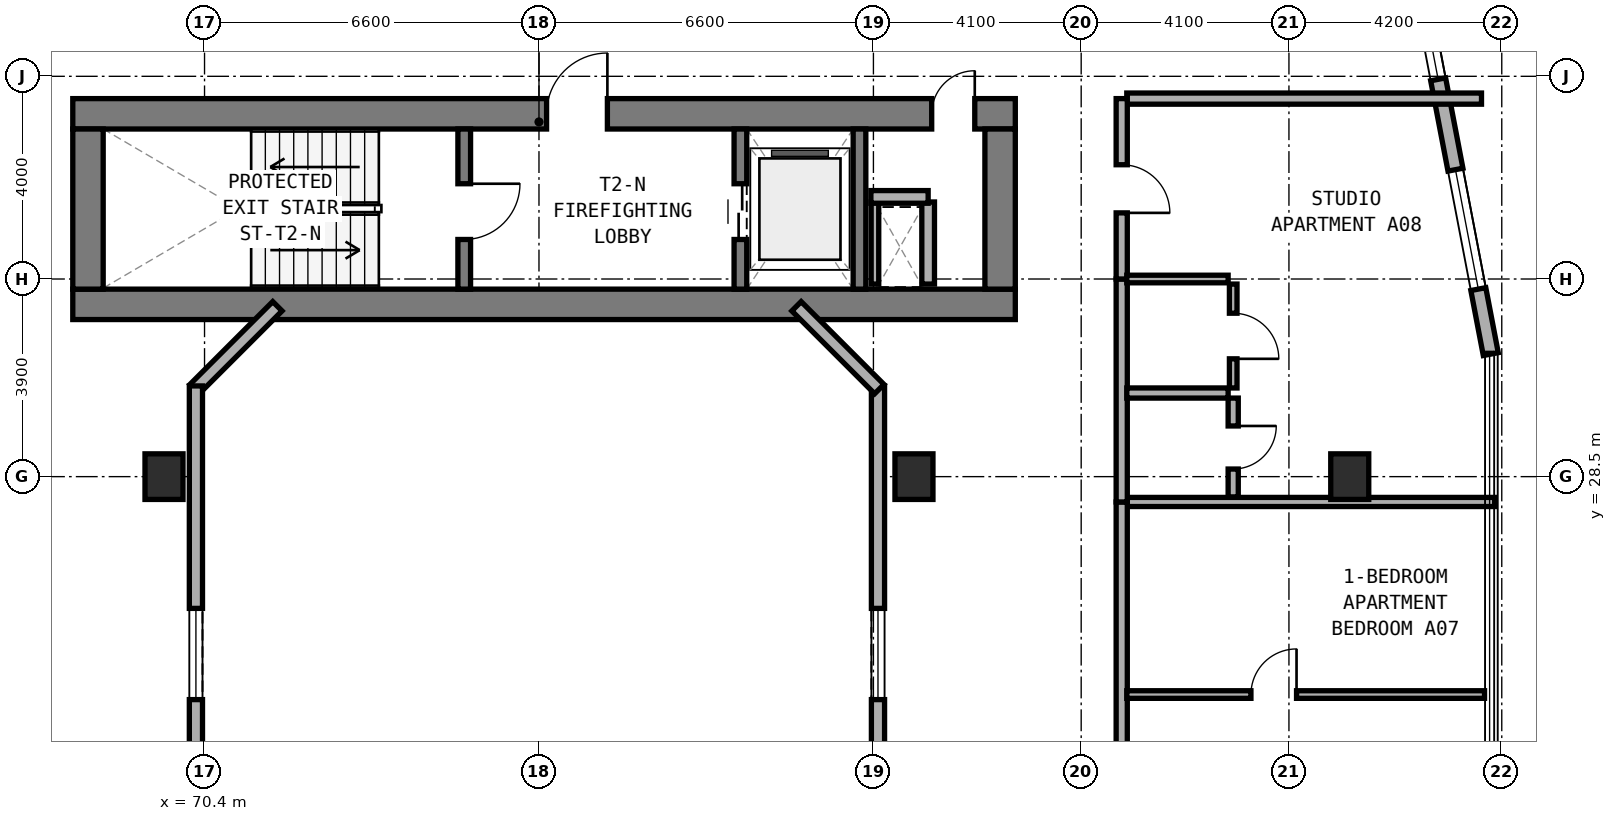
"""IFC4 building model, lengths in metres.
Left out: names, types, materials, properties, quantities, classifications, styles, units other than length and angle.
Written with IfcOpenShell. Run it as: python <this file> out.ifc"""

import sys

from ifc_helpers import new_model, si_unit, direction, frame, frame_2d, origin, origin_2d, place, context, subcontext, project, spatial, rectangle, extrude, element, fill, save


model = new_model("IFC4")
c1 = context("Model", 3, precision=1e-05, world=origin(), true_north=direction((0.0, 1.0)))
c2 = subcontext(c1, "Body", "Model", "MODEL_VIEW")
j1 = project(units=[si_unit("LENGTHUNIT", "METRE"), si_unit("PLANEANGLEUNIT", "RADIAN")], contexts=[c1])
p1 = place(None, origin())
s1 = spatial("IfcSite", under=j1, at=p1, CompositionType="ELEMENT")
p2 = place(p1, origin())
s2 = spatial("IfcBuilding", under=s1, at=p2, CompositionType="ELEMENT")
p3 = place(p2, frame((0.0, 0.0, 24.0)))
s3 = spatial("IfcBuildingStorey", under=s2, at=p3, CompositionType="ELEMENT", Elevation=24.0)
p4 = place(p3, frame((67.8, 31.9, 0.0), z_axis=(0.0, 0.0, 1.0), x_axis=(1.0, 0.0, 0.0)))
e1 = element("IfcWall", 1, at=p4, inside=s3, PredefinedType="SHEAR", context=c2, shape_type="SweptSolid", body=[
    extrude(rectangle(XDim=18.6, YDim=0.6, at=frame_2d((9.3, 0.0))), origin(), (0.0, 0.0, 1.0), 3.5),
])
p5 = place(p3, frame((67.8, 35.66, 0.0), z_axis=(0.0, 0.0, 1.0), x_axis=(1.0, 0.0, 0.0)))
e2 = element("IfcWall", 2, at=p5, inside=s3, PredefinedType="SHEAR", context=c2, shape_type="SweptSolid", body=[
    extrude(rectangle(XDim=18.6, YDim=0.6, at=frame_2d((9.3, 0.0))), origin(), (0.0, 0.0, 1.0), 3.5),
])
p6 = place(p5, frame((9.35, 0.0, 0.0)))
e3 = element("IfcOpeningElement", 3, at=p6, cuts=e2, PredefinedType="OPENING", context=c2, shape_type="SweptSolid", body=[
    extrude(rectangle(XDim=1.2, YDim=2.15, at=frame_2d((0.6, 1.075))), frame((0.0, 0.31, 0.0), z_axis=(0.0, -1.0, 0.0), x_axis=(1.0, 0.0, 0.0)), (0.0, 0.0, 1.0), 0.62),
])
p7 = place(p5, frame((16.95, 0.0, 0.0)))
e4 = element("IfcOpeningElement", 4, at=p7, cuts=e2, PredefinedType="OPENING", context=c2, shape_type="SweptSolid", body=[
    extrude(rectangle(XDim=0.85, YDim=2.1, at=frame_2d((0.425, 1.05))), frame((0.0, 0.31, 0.0), z_axis=(0.0, -1.0, 0.0), x_axis=(1.0, 0.0, 0.0)), (0.0, 0.0, 1.0), 0.62),
])
for number, where, z_axis, x_axis in (
    (5, (68.1, 32.2, 0.0), (0.0, 0.0, 1.0), (0.0, 1.0, 0.0)),
    (6, (86.1, 32.2, 0.0), (0.0, 0.0, 1.0), (0.0, 1.0, 0.0)),
):
    element("IfcWall", number, at=place(p3, frame(where, z_axis=z_axis, x_axis=x_axis)), inside=s3, PredefinedType="SHEAR", context=c2, shape_type="SweptSolid", body=[
        extrude(rectangle(XDim=3.16, YDim=0.6, at=frame_2d((1.58, 0.0))), origin(), (0.0, 0.0, 1.0), 3.5),
    ])
p8 = place(p3, frame((75.525, 32.2, 0.0), z_axis=(0.0, 0.0, 1.0), x_axis=(0.0, 1.0, 0.0)))
e7 = element("IfcWall", 7, at=p8, inside=s3, PredefinedType="STANDARD", context=c2, shape_type="SweptSolid", body=[
    extrude(rectangle(XDim=3.16, YDim=0.25, at=frame_2d((1.58, 0.0))), origin(), (0.0, 0.0, 1.0), 3.25),
])
p9 = place(p8, frame((0.98, 0.0, 0.0)))
e8 = element("IfcOpeningElement", 8, at=p9, cuts=e7, PredefinedType="OPENING", context=c2, shape_type="SweptSolid", body=[
    extrude(rectangle(XDim=1.1, YDim=2.15, at=frame_2d((0.55, 1.075))), frame((0.0, 0.135, 0.0), z_axis=(0.0, -1.0, 0.0), x_axis=(1.0, 0.0, 0.0)), (0.0, 0.0, 1.0), 0.27),
])
p10 = place(p3, frame((80.975, 32.2, 0.0), z_axis=(0.0, 0.0, 1.0), x_axis=(0.0, 1.0, 0.0)))
e9 = element("IfcWall", 9, at=p10, inside=s3, PredefinedType="STANDARD", context=c2, shape_type="SweptSolid", body=[
    extrude(rectangle(XDim=3.16, YDim=0.25, at=frame_2d((1.58, 0.0))), origin(), (0.0, 0.0, 1.0), 3.25),
])
p11 = place(p10, frame((0.98, 0.0, 0.0)))
e10 = element("IfcOpeningElement", 10, at=p11, cuts=e9, PredefinedType="OPENING", context=c2, shape_type="SweptSolid", body=[
    extrude(rectangle(XDim=1.1, YDim=2.15, at=frame_2d((0.55, 1.075))), frame((0.0, 0.135, 0.0), z_axis=(0.0, -1.0, 0.0), x_axis=(1.0, 0.0, 0.0)), (0.0, 0.0, 1.0), 0.27),
])
p12 = place(p3, frame((83.325, 32.2, 0.0), z_axis=(0.0, 0.0, 1.0), x_axis=(0.0, 1.0, 0.0)))
e11 = element("IfcWall", 11, at=p12, inside=s3, PredefinedType="STANDARD", context=c2, shape_type="SweptSolid", body=[
    extrude(rectangle(XDim=3.16, YDim=0.25, at=frame_2d((1.58, 0.0))), origin(), (0.0, 0.0, 1.0), 3.25),
])
for number, where, z_axis, x_axis in (
    (12, (93.0, 28.5, 0.0), (0.0, 0.0, 1.0), (1.0, 0.0, 0.0)),
    (13, (69.6, 28.5, 0.0), (0.0, 0.0, 1.0), (1.0, 0.0, 0.0)),
    (14, (84.4, 28.5, 0.0), (0.0, 0.0, 1.0), (1.0, 0.0, 0.0)),
):
    element("IfcColumn", number, at=place(p3, frame(where, z_axis=z_axis, x_axis=x_axis)), inside=s3, PredefinedType="COLUMN", context=c2, shape_type="SweptSolid", body=[
        extrude(rectangle(XDim=0.75, YDim=0.9, at=origin_2d()), origin(), (0.0, 0.0, 1.0), 3.5),
    ])
p13 = place(p3, frame((95.783, 30.918, 0.0), z_axis=(0.0, 0.0, 1.0), x_axis=(-0.188087874316, 0.982152203854, 0.0)))
e15 = element("IfcWall", 15, at=p13, inside=s3, PredefinedType="STANDARD", context=c2, shape_type="SweptSolid", body=[
    extrude(rectangle(XDim=9.634, YDim=0.3, at=frame_2d((4.817, 0.0))), origin(), (0.0, 0.0, 1.0), 3.25),
])
p14 = place(p13, frame((1.306, 0.0, 0.8)))
e16 = element("IfcOpeningElement", 16, at=p14, cuts=e15, PredefinedType="OPENING", context=c2, shape_type="SweptSolid", body=[
    extrude(rectangle(XDim=2.4, YDim=1.6, at=frame_2d((1.2, 0.8))), frame((0.0, 0.16, 0.0), z_axis=(0.0, -1.0, 0.0), x_axis=(1.0, 0.0, 0.0)), (0.0, 0.0, 1.0), 0.32),
])
p15 = place(p13, frame((5.521, 0.0, 0.85)))
e17 = element("IfcOpeningElement", 17, at=p15, cuts=e15, PredefinedType="OPENING", context=c2, shape_type="SweptSolid", body=[
    extrude(rectangle(XDim=1.2, YDim=1.5, at=frame_2d((0.6, 0.75))), frame((0.0, 0.16, 0.0), z_axis=(0.0, -1.0, 0.0), x_axis=(1.0, 0.0, 0.0)), (0.0, 0.0, 1.0), 0.32),
])
p16 = place(p13, frame((7.682, 0.0, 0.85)))
e18 = element("IfcOpeningElement", 18, at=p16, cuts=e15, PredefinedType="OPENING", context=c2, shape_type="SweptSolid", body=[
    extrude(rectangle(XDim=1.5, YDim=1.5, at=frame_2d((0.75, 0.75))), frame((0.0, 0.16, 0.0), z_axis=(0.0, -1.0, 0.0), x_axis=(1.0, 0.0, 0.0)), (0.0, 0.0, 1.0), 0.32),
])
p17 = place(p3, frame((83.69, 19.71, 0.0), z_axis=(0.0, 0.0, 1.0), x_axis=(0.0, 1.0, 0.0)))
e19 = element("IfcWall", 19, at=p17, inside=s3, PredefinedType="STANDARD", context=c2, shape_type="SweptSolid", body=[
    extrude(rectangle(XDim=10.58, YDim=0.26, at=frame_2d((5.29, 0.0))), origin(), (0.0, 0.0, 1.0), 3.25),
])
p18 = place(p17, frame((4.39, 0.0, 0.85)))
e20 = element("IfcOpeningElement", 20, at=p18, cuts=e19, PredefinedType="OPENING", context=c2, shape_type="SweptSolid", body=[
    extrude(rectangle(XDim=1.8, YDim=1.5, at=frame_2d((0.9, 0.75))), frame((0.0, 0.14, 0.0), z_axis=(0.0, -1.0, 0.0), x_axis=(1.0, 0.0, 0.0)), (0.0, 0.0, 1.0), 0.28),
])
for number, where, z_axis, x_axis in (
    (21, (83.716, 30.228, 0.0), (0.0, 0.0, 1.0), (-0.707, 0.707, 0.0)),
    (22, (71.838, 31.862, 0.0), (0.0, 0.0, 1.0), (-0.707, -0.707, 0.0)),
):
    element("IfcWall", number, at=place(p3, frame(where, z_axis=z_axis, x_axis=x_axis)), inside=s3, PredefinedType="STANDARD", context=c2, shape_type="SweptSolid", body=[
        extrude(rectangle(XDim=2.311, YDim=0.26, at=frame_2d((1.155, 0.0))), origin(), (0.0, 0.0, 1.0), 3.25),
    ])
p19 = place(p3, frame((70.23, 30.29, 0.0), z_axis=(0.0, 0.0, 1.0), x_axis=(0.0, -1.0, 0.0)))
e23 = element("IfcWall", 23, at=p19, inside=s3, PredefinedType="STANDARD", context=c2, shape_type="SweptSolid", body=[
    extrude(rectangle(XDim=10.58, YDim=0.26, at=frame_2d((5.29, 0.0))), origin(), (0.0, 0.0, 1.0), 3.25),
])
p20 = place(p19, frame((4.39, 0.0, 0.85)))
e24 = element("IfcOpeningElement", 24, at=p20, cuts=e23, PredefinedType="OPENING", context=c2, shape_type="SweptSolid", body=[
    extrude(rectangle(XDim=1.8, YDim=1.5, at=frame_2d((0.9, 0.75))), frame((0.0, 0.14, 0.0), z_axis=(0.0, -1.0, 0.0), x_axis=(1.0, 0.0, 0.0)), (0.0, 0.0, 1.0), 0.28),
])
p21 = place(p3, frame((83.63, 32.3, 0.0), z_axis=(0.0, 0.0, 1.0), x_axis=(0.0, 1.0, 0.0)))
e25 = element("IfcWall", 25, at=p21, inside=s3, PredefinedType="PARTITIONING", context=c2, shape_type="SweptSolid", body=[
    extrude(rectangle(XDim=1.62, YDim=0.15, at=frame_2d((0.81, 0.0))), origin(), (0.0, 0.0, 1.0), 2.725),
])
p22 = place(p3, frame((84.68, 32.3, 0.0), z_axis=(0.0, 0.0, 1.0), x_axis=(0.0, 1.0, 0.0)))
e26 = element("IfcWall", 26, at=p22, inside=s3, PredefinedType="SOLIDWALL", context=c2, shape_type="SweptSolid", body=[
    extrude(rectangle(XDim=1.62, YDim=0.25, at=frame_2d((0.81, 0.0))), origin(), (0.0, 0.0, 1.0), 3.22),
])
p23 = place(p3, frame((83.55, 34.02, 0.0), z_axis=(0.0, 0.0, 1.0), x_axis=(1.0, 0.0, 0.0)))
e27 = element("IfcWall", 27, at=p23, inside=s3, PredefinedType="SOLIDWALL", context=c2, shape_type="SweptSolid", body=[
    extrude(rectangle(XDim=1.13, YDim=0.25, at=frame_2d((0.565, 0.0))), origin(), (0.0, 0.0, 1.0), 3.22),
])
p24 = place(p3, frame((88.6, 35.96, 0.0), z_axis=(0.0, 0.0, 1.0), x_axis=(1.0, 0.0, 0.0)))
e28 = element("IfcWall", 28, at=p24, inside=s3, PredefinedType="SOLIDWALL", context=c2, shape_type="SweptSolid", body=[
    extrude(rectangle(XDim=7.0, YDim=0.22, at=frame_2d((3.5, 0.0))), origin(), (0.0, 0.0, 1.0), 2.865),
])
p25 = place(p3, frame((88.5, 28.0, 0.0), z_axis=(0.0, 0.0, 1.0), x_axis=(1.0, 0.0, 0.0)))
e29 = element("IfcWall", 29, at=p25, inside=s3, PredefinedType="SOLIDWALL", context=c2, shape_type="SweptSolid", body=[
    extrude(rectangle(XDim=7.36, YDim=0.18, at=frame_2d((3.68, 0.0))), origin(), (0.0, 0.0, 1.0), 2.865),
])
p26 = place(p3, frame((88.5, 18.44, 0.0), z_axis=(0.0, 0.0, 1.0), x_axis=(0.0, 1.0, 0.0)))
e30 = element("IfcWall", 30, at=p26, inside=s3, PredefinedType="SOLIDWALL", context=c2, shape_type="SweptSolid", body=[
    extrude(rectangle(XDim=9.56, YDim=0.22, at=frame_2d((4.78, 0.0))), origin(), (0.0, 0.0, 1.0), 2.725),
])
p27 = place(p26, frame((2.405, 0.0, 0.0)))
e31 = element("IfcOpeningElement", 31, at=p27, cuts=e30, PredefinedType="OPENING", context=c2, shape_type="SweptSolid", body=[
    extrude(rectangle(XDim=0.95, YDim=2.1, at=frame_2d((0.475, 1.05))), frame((0.0, 0.12, 0.0), z_axis=(0.0, -1.0, 0.0), x_axis=(1.0, 0.0, 0.0)), (0.0, 0.0, 1.0), 0.24),
])
p28 = place(p3, frame((88.6, 24.2, 0.0), z_axis=(0.0, 0.0, 1.0), x_axis=(1.0, 0.0, 0.0)))
e32 = element("IfcWall", 32, at=p28, inside=s3, PredefinedType="PARTITIONING", context=c2, shape_type="SweptSolid", body=[
    extrude(rectangle(XDim=7.06, YDim=0.15, at=frame_2d((3.53, 0.0))), origin(), (0.0, 0.0, 1.0), 2.865),
])
p29 = place(p28, frame((2.45, 0.0, 0.0)))
e33 = element("IfcOpeningElement", 33, at=p29, cuts=e32, PredefinedType="OPENING", context=c2, shape_type="SweptSolid", body=[
    extrude(rectangle(XDim=0.9, YDim=2.1, at=frame_2d((0.45, 1.05))), frame((0.0, 0.085, 0.0), z_axis=(0.0, -1.0, 0.0), x_axis=(1.0, 0.0, 0.0)), (0.0, 0.0, 1.0), 0.17),
])
p30 = place(p3, frame((88.5, 28.0, 0.0), z_axis=(0.0, 0.0, 1.0), x_axis=(0.0, 1.0, 0.0)))
e34 = element("IfcWall", 34, at=p30, inside=s3, PredefinedType="SOLIDWALL", context=c2, shape_type="SweptSolid", body=[
    extrude(rectangle(XDim=4.4, YDim=0.22, at=frame_2d((2.2, 0.0))), origin(), (0.0, 0.0, 1.0), 2.725),
])
p31 = place(p3, frame((88.5, 32.4, 0.0), z_axis=(0.0, 0.0, 1.0), x_axis=(0.0, 1.0, 0.0)))
e35 = element("IfcWall", 35, at=p31, inside=s3, PredefinedType="SOLIDWALL", context=c2, shape_type="SweptSolid", body=[
    extrude(rectangle(XDim=3.56, YDim=0.22, at=frame_2d((1.78, 0.0))), origin(), (0.0, 0.0, 1.0), 3.22),
])
p32 = place(p31, frame((1.305, 0.0, 0.0)))
e36 = element("IfcOpeningElement", 36, at=p32, cuts=e35, PredefinedType="OPENING", context=c2, shape_type="SweptSolid", body=[
    extrude(rectangle(XDim=0.95, YDim=2.1, at=frame_2d((0.475, 1.05))), frame((0.0, 0.12, 0.0), z_axis=(0.0, -1.0, 0.0), x_axis=(1.0, 0.0, 0.0)), (0.0, 0.0, 1.0), 0.24),
])
p33 = place(p3, frame((88.6, 30.15, 0.0), z_axis=(0.0, 0.0, 1.0), x_axis=(1.0, 0.0, 0.0)))
e37 = element("IfcWall", 37, at=p33, inside=s3, PredefinedType="PLUMBINGWALL", context=c2, shape_type="SweptSolid", body=[
    extrude(rectangle(XDim=2.0, YDim=0.2, at=frame_2d((1.0, 0.0))), origin(), (0.0, 0.0, 1.0), 3.22),
])
p34 = place(p3, frame((88.6, 32.4, 0.0), z_axis=(0.0, 0.0, 1.0), x_axis=(1.0, 0.0, 0.0)))
e38 = element("IfcWall", 38, at=p34, inside=s3, PredefinedType="PARTITIONING", context=c2, shape_type="SweptSolid", body=[
    extrude(rectangle(XDim=2.0, YDim=0.15, at=frame_2d((1.0, 0.0))), origin(), (0.0, 0.0, 1.0), 3.22),
])
p35 = place(p3, frame((90.7, 28.1, 0.0), z_axis=(0.0, 0.0, 1.0), x_axis=(0.0, 1.0, 0.0)))
e39 = element("IfcWall", 39, at=p35, inside=s3, PredefinedType="PLUMBINGWALL", context=c2, shape_type="SweptSolid", body=[
    extrude(rectangle(XDim=1.95, YDim=0.2, at=frame_2d((0.975, 0.0))), origin(), (0.0, 0.0, 1.0), 2.725),
])
p36 = place(p35, frame((0.55, 0.0, 0.0)))
e40 = element("IfcOpeningElement", 40, at=p36, cuts=e39, PredefinedType="OPENING", context=c2, shape_type="SweptSolid", body=[
    extrude(rectangle(XDim=0.85, YDim=2.1, at=frame_2d((0.425, 1.05))), frame((0.0, 0.11, 0.0), z_axis=(0.0, -1.0, 0.0), x_axis=(1.0, 0.0, 0.0)), (0.0, 0.0, 1.0), 0.22),
])
p37 = place(p3, frame((90.7, 30.25, 0.0), z_axis=(0.0, 0.0, 1.0), x_axis=(0.0, 1.0, 0.0)))
e41 = element("IfcWall", 41, at=p37, inside=s3, PredefinedType="PARTITIONING", context=c2, shape_type="SweptSolid", body=[
    extrude(rectangle(XDim=2.05, YDim=0.15, at=frame_2d((1.025, 0.0))), origin(), (0.0, 0.0, 1.0), 3.22),
])
p38 = place(p37, frame((0.575, 0.0, 0.0)))
e42 = element("IfcOpeningElement", 42, at=p38, cuts=e41, PredefinedType="OPENING", context=c2, shape_type="SweptSolid", body=[
    extrude(rectangle(XDim=0.9, YDim=2.1, at=frame_2d((0.45, 1.05))), frame((0.0, 0.085, 0.0), z_axis=(0.0, -1.0, 0.0), x_axis=(1.0, 0.0, 0.0)), (0.0, 0.0, 1.0), 0.17),
])
p39 = place(p14, origin())
e43 = element("IfcWindow", 43, at=p39, inside=s3, PartitioningType="SINGLE_PANEL", PredefinedType="WINDOW", context=c2, shape_type="SweptSolid", body=[
    extrude(rectangle(XDim=2.4, YDim=1.6, at=frame_2d((1.2, 0.8))), frame((0.0, 0.03, 0.0), z_axis=(0.0, -1.0, 0.0), x_axis=(1.0, 0.0, 0.0)), (0.0, 0.0, 1.0), 0.06),
])
fill(e16, e43)
p40 = place(p15, origin())
e44 = element("IfcWindow", 44, at=p40, inside=s3, PartitioningType="SINGLE_PANEL", PredefinedType="WINDOW", context=c2, shape_type="SweptSolid", body=[
    extrude(rectangle(XDim=1.2, YDim=1.5, at=frame_2d((0.6, 0.75))), frame((0.0, 0.03, 0.0), z_axis=(0.0, -1.0, 0.0), x_axis=(1.0, 0.0, 0.0)), (0.0, 0.0, 1.0), 0.06),
])
fill(e17, e44)
p41 = place(p18, origin())
e45 = element("IfcWindow", 45, at=p41, inside=s3, PartitioningType="SINGLE_PANEL", PredefinedType="WINDOW", context=c2, shape_type="SweptSolid", body=[
    extrude(rectangle(XDim=1.8, YDim=1.5, at=frame_2d((0.9, 0.75))), frame((0.0, 0.03, 0.0), z_axis=(0.0, -1.0, 0.0), x_axis=(1.0, 0.0, 0.0)), (0.0, 0.0, 1.0), 0.06),
])
fill(e20, e45)
p42 = place(p20, origin())
e46 = element("IfcWindow", 46, at=p42, inside=s3, PartitioningType="SINGLE_PANEL", PredefinedType="WINDOW", context=c2, shape_type="SweptSolid", body=[
    extrude(rectangle(XDim=1.8, YDim=1.5, at=frame_2d((0.9, 0.75))), frame((0.0, 0.03, 0.0), z_axis=(0.0, -1.0, 0.0), x_axis=(1.0, 0.0, 0.0)), (0.0, 0.0, 1.0), 0.06),
])
fill(e24, e46)
p43 = place(p9, frame((1.1, 0.0, 0.0), z_axis=(0.0, 0.0, 1.0), x_axis=(-1.0, 0.0, 0.0)))
e47 = element("IfcDoor", 47, at=p43, inside=s3, OperationType="SINGLE_SWING_LEFT", PredefinedType="DOOR", context=c2, shape_type="SweptSolid", body=[
    extrude(rectangle(XDim=1.1, YDim=2.15, at=frame_2d((0.55, 1.075))), frame((0.0, 0.025, 0.0), z_axis=(0.0, -1.0, 0.0), x_axis=(1.0, 0.0, 0.0)), (0.0, 0.0, 1.0), 0.05),
])
fill(e8, e47)
p44 = place(p6, origin())
e48 = element("IfcDoor", 48, at=p44, inside=s3, OperationType="SINGLE_SWING_RIGHT", PredefinedType="DOOR", context=c2, shape_type="SweptSolid", body=[
    extrude(rectangle(XDim=1.2, YDim=2.15, at=frame_2d((0.6, 1.075))), frame((0.0, 0.025, 0.0), z_axis=(0.0, -1.0, 0.0), x_axis=(1.0, 0.0, 0.0)), (0.0, 0.0, 1.0), 0.05),
])
fill(e3, e48)
p45 = place(p11, origin())
e49 = element("IfcDoor", 49, at=p45, inside=s3, OperationType="DOUBLE_DOOR_SLIDING", PredefinedType="DOOR", context=c2, shape_type="SweptSolid", body=[
    extrude(rectangle(XDim=1.1, YDim=2.15, at=frame_2d((0.55, 1.075))), frame((0.0, 0.025, 0.0), z_axis=(0.0, -1.0, 0.0), x_axis=(1.0, 0.0, 0.0)), (0.0, 0.0, 1.0), 0.05),
])
fill(e10, e49)
p46 = place(p7, origin())
e50 = element("IfcDoor", 50, at=p46, inside=s3, OperationType="SINGLE_SWING_RIGHT", PredefinedType="DOOR", context=c2, shape_type="SweptSolid", body=[
    extrude(rectangle(XDim=0.85, YDim=2.1, at=frame_2d((0.425, 1.05))), frame((0.0, 0.025, 0.0), z_axis=(0.0, -1.0, 0.0), x_axis=(1.0, 0.0, 0.0)), (0.0, 0.0, 1.0), 0.05),
])
fill(e4, e50)
p47 = place(p29, origin())
e51 = element("IfcDoor", 51, at=p47, inside=s3, OperationType="SINGLE_SWING_RIGHT", PredefinedType="DOOR", context=c2, shape_type="SweptSolid", body=[
    extrude(rectangle(XDim=0.9, YDim=2.1, at=frame_2d((0.45, 1.05))), frame((0.0, 0.025, 0.0), z_axis=(0.0, -1.0, 0.0), x_axis=(1.0, 0.0, 0.0)), (0.0, 0.0, 1.0), 0.05),
])
fill(e33, e51)
p48 = place(p32, frame((0.95, 0.0, 0.0), z_axis=(0.0, 0.0, 1.0), x_axis=(-1.0, 0.0, 0.0)))
e52 = element("IfcDoor", 52, at=p48, inside=s3, OperationType="SINGLE_SWING_RIGHT", PredefinedType="DOOR", context=c2, shape_type="SweptSolid", body=[
    extrude(rectangle(XDim=0.95, YDim=2.1, at=frame_2d((0.475, 1.05))), frame((0.0, 0.025, 0.0), z_axis=(0.0, -1.0, 0.0), x_axis=(1.0, 0.0, 0.0)), (0.0, 0.0, 1.0), 0.05),
])
fill(e36, e52)
p49 = place(p36, frame((0.85, 0.0, 0.0), z_axis=(0.0, 0.0, 1.0), x_axis=(-1.0, 0.0, 0.0)))
e53 = element("IfcDoor", 53, at=p49, inside=s3, OperationType="SINGLE_SWING_LEFT", PredefinedType="DOOR", context=c2, shape_type="SweptSolid", body=[
    extrude(rectangle(XDim=0.85, YDim=2.1, at=frame_2d((0.425, 1.05))), frame((0.0, 0.025, 0.0), z_axis=(0.0, -1.0, 0.0), x_axis=(1.0, 0.0, 0.0)), (0.0, 0.0, 1.0), 0.05),
])
fill(e40, e53)
p50 = place(p38, frame((0.9, 0.0, 0.0), z_axis=(0.0, 0.0, 1.0), x_axis=(-1.0, 0.0, 0.0)))
e54 = element("IfcDoor", 54, at=p50, inside=s3, OperationType="SINGLE_SWING_RIGHT", PredefinedType="DOOR", context=c2, shape_type="SweptSolid", body=[
    extrude(rectangle(XDim=0.9, YDim=2.1, at=frame_2d((0.45, 1.05))), frame((0.0, 0.025, 0.0), z_axis=(0.0, -1.0, 0.0), x_axis=(1.0, 0.0, 0.0)), (0.0, 0.0, 1.0), 0.05),
])
fill(e42, e54)
save(model, sys.argv[1])
